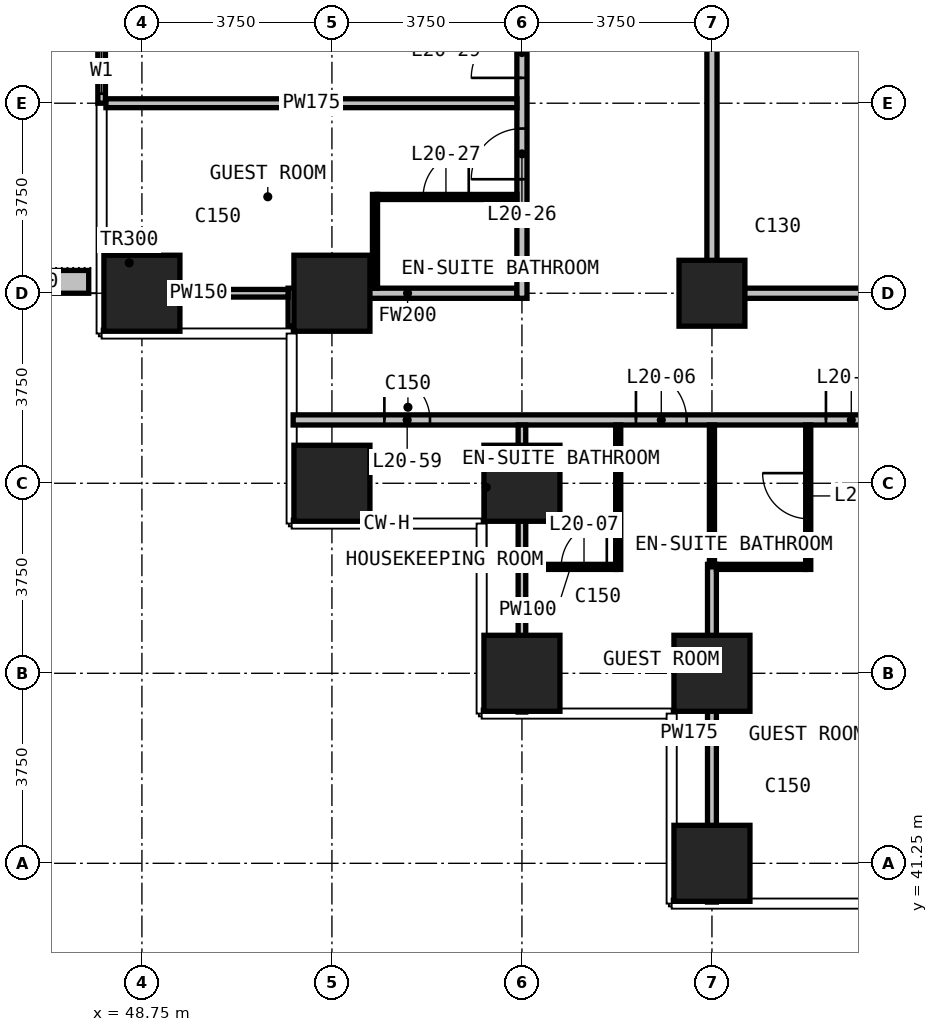
"""IFC4 building model, lengths in metres.
Left out: names, types, materials, properties, quantities, classifications, styles, units other than length and angle.
Written with IfcOpenShell. Run it as: python <this file> out.ifc"""

import sys

from ifc_helpers import new_model, si_unit, direction, frame, frame_2d, origin, origin_2d, place, context, subcontext, project, spatial, rectangle, extrude, element, fill, save


model = new_model("IFC4")
c1 = context("Model", 3, precision=1e-05, world=origin(), true_north=direction((0.0, 1.0)))
c2 = subcontext(c1, "Body", "Model", "MODEL_VIEW")
j1 = project(units=[si_unit("LENGTHUNIT", "METRE"), si_unit("PLANEANGLEUNIT", "RADIAN")], contexts=[c1])
p1 = place(None, origin())
s1 = spatial("IfcSite", under=j1, at=p1, CompositionType="ELEMENT")
p2 = place(p1, origin())
s2 = spatial("IfcBuilding", under=s1, at=p2, CompositionType="ELEMENT")
p3 = place(p2, frame((0.0, 0.0, 85.7)))
s3 = spatial("IfcBuildingStorey", under=s2, at=p3, CompositionType="ELEMENT", Elevation=85.7)
for number, where, z_axis, x_axis in (
    (1, (48.75, 52.5, 0.0), (0.0, 0.0, 1.0), (1.0, 0.0, 0.0)),
    (2, (52.5, 48.75, 0.0), (0.0, 0.0, 1.0), (1.0, 0.0, 0.0)),
    (3, (52.5, 52.5, 0.0), (0.0, 0.0, 1.0), (1.0, 0.0, 0.0)),
    (4, (56.25, 45.0, 0.0), (0.0, 0.0, 1.0), (1.0, 0.0, 0.0)),
    (5, (56.25, 48.75, 0.0), (0.0, 0.0, 1.0), (1.0, 0.0, 0.0)),
    (6, (60.0, 41.25, 0.0), (0.0, 0.0, 1.0), (1.0, 0.0, 0.0)),
    (7, (60.0, 45.0, 0.0), (0.0, 0.0, 1.0), (1.0, 0.0, 0.0)),
):
    element("IfcColumn", number, at=place(p3, frame(where, z_axis=z_axis, x_axis=x_axis)), inside=s3, PredefinedType="COLUMN", context=c2, shape_type="SweptSolid", body=[
        extrude(rectangle(XDim=1.5, YDim=1.5, at=origin_2d()), origin(), (0.0, 0.0, 1.0), 3.3),
    ])
p4 = place(p3, frame((60.0, 52.5, 0.0), z_axis=(0.0, 0.0, 1.0), x_axis=(1.0, 0.0, 0.0)))
e8 = element("IfcColumn", 8, at=p4, inside=s3, PredefinedType="COLUMN", context=c2, shape_type="SweptSolid", body=[
    extrude(rectangle(XDim=1.3, YDim=1.3, at=origin_2d()), origin(), (0.0, 0.0, 1.0), 3.3),
])
p5 = place(p3, frame((47.955, 56.25, 0.0), z_axis=(0.0, 0.0, 1.0), x_axis=(0.0, 1.0, 0.0)))
e9 = element("IfcWall", 9, at=p5, inside=s3, PredefinedType="SOLIDWALL", context=c2, shape_type="SweptSolid", body=[
    extrude(rectangle(XDim=3.75, YDim=0.15, at=frame_2d((1.875, 0.0))), origin(), (0.0, 0.0, 1.0), 3.0),
])
p6 = place(p5, frame((0.188, 0.0, 0.1)))
e10 = element("IfcOpeningElement", 10, at=p6, cuts=e9, PredefinedType="OPENING", context=c2, shape_type="SweptSolid", body=[
    extrude(rectangle(XDim=0.9, YDim=2.4, at=frame_2d((0.45, 1.2))), frame((0.0, 0.085, 0.0), z_axis=(0.0, -1.0, 0.0), x_axis=(1.0, 0.0, 0.0)), (0.0, 0.0, 1.0), 0.17),
])
p7 = place(p5, frame((1.275, 0.0, 0.0)))
e11 = element("IfcOpeningElement", 11, at=p7, cuts=e9, PredefinedType="OPENING", context=c2, shape_type="SweptSolid", body=[
    extrude(rectangle(XDim=1.2, YDim=2.4, at=frame_2d((0.6, 1.2))), frame((0.0, 0.085, 0.0), z_axis=(0.0, -1.0, 0.0), x_axis=(1.0, 0.0, 0.0)), (0.0, 0.0, 1.0), 0.17),
])
p8 = place(p3, frame((47.7, 52.725, 0.0), z_axis=(0.0, 0.0, 1.0), x_axis=(-1.0, 0.0, 0.0)))
e12 = element("IfcWall", 12, at=p8, inside=s3, PredefinedType="USERDEFINED", context=c2, shape_type="SweptSolid", body=[
    extrude(rectangle(XDim=2.35, YDim=0.45, at=frame_2d((1.175, 0.0))), origin(), (0.0, 0.0, 1.0), 1.1),
])
p9 = place(p3, frame((51.735, 50.0, 0.0), z_axis=(0.0, 0.0, 1.0), x_axis=(1.0, 0.0, 0.0)))
e13 = element("IfcWall", 13, at=p9, inside=s3, PredefinedType="PARTITIONING", context=c2, shape_type="SweptSolid", body=[
    extrude(rectangle(XDim=46.53, YDim=0.2, at=frame_2d((23.265, 0.0))), origin(), (0.0, 0.0, 1.0), 3.0),
])
p10 = place(p9, frame((6.765, 0.0, 0.0)))
e14 = element("IfcOpeningElement", 14, at=p10, cuts=e13, PredefinedType="OPENING", context=c2, shape_type="SweptSolid", body=[
    extrude(rectangle(XDim=1.0, YDim=2.2, at=frame_2d((0.5, 1.1))), frame((0.0, 0.11, 0.0), z_axis=(0.0, -1.0, 0.0), x_axis=(1.0, 0.0, 0.0)), (0.0, 0.0, 1.0), 0.22),
])
p11 = place(p9, frame((10.515, 0.0, 0.0)))
e15 = element("IfcOpeningElement", 15, at=p11, cuts=e13, PredefinedType="OPENING", context=c2, shape_type="SweptSolid", body=[
    extrude(rectangle(XDim=1.0, YDim=2.2, at=frame_2d((0.5, 1.1))), frame((0.0, 0.11, 0.0), z_axis=(0.0, -1.0, 0.0), x_axis=(1.0, 0.0, 0.0)), (0.0, 0.0, 1.0), 0.22),
])
p12 = place(p9, frame((12.515, 0.0, 0.0)))
e16 = element("IfcOpeningElement", 16, at=p12, cuts=e13, PredefinedType="OPENING", context=c2, shape_type="SweptSolid", body=[
    extrude(rectangle(XDim=1.0, YDim=2.2, at=frame_2d((0.5, 1.1))), frame((0.0, 0.11, 0.0), z_axis=(0.0, -1.0, 0.0), x_axis=(1.0, 0.0, 0.0)), (0.0, 0.0, 1.0), 0.22),
])
p13 = place(p9, frame((18.015, 0.0, 0.0)))
e17 = element("IfcOpeningElement", 17, at=p13, cuts=e13, PredefinedType="OPENING", context=c2, shape_type="SweptSolid", body=[
    extrude(rectangle(XDim=1.0, YDim=2.2, at=frame_2d((0.5, 1.1))), frame((0.0, 0.11, 0.0), z_axis=(0.0, -1.0, 0.0), x_axis=(1.0, 0.0, 0.0)), (0.0, 0.0, 1.0), 0.22),
])
p14 = place(p9, frame((20.015, 0.0, 0.0)))
e18 = element("IfcOpeningElement", 18, at=p14, cuts=e13, PredefinedType="OPENING", context=c2, shape_type="SweptSolid", body=[
    extrude(rectangle(XDim=1.0, YDim=2.2, at=frame_2d((0.5, 1.1))), frame((0.0, 0.11, 0.0), z_axis=(0.0, -1.0, 0.0), x_axis=(1.0, 0.0, 0.0)), (0.0, 0.0, 1.0), 0.22),
])
p15 = place(p9, frame((25.515, 0.0, 0.0)))
e19 = element("IfcOpeningElement", 19, at=p15, cuts=e13, PredefinedType="OPENING", context=c2, shape_type="SweptSolid", body=[
    extrude(rectangle(XDim=1.0, YDim=2.2, at=frame_2d((0.5, 1.1))), frame((0.0, 0.11, 0.0), z_axis=(0.0, -1.0, 0.0), x_axis=(1.0, 0.0, 0.0)), (0.0, 0.0, 1.0), 0.22),
])
p16 = place(p9, frame((27.515, 0.0, 0.0)))
e20 = element("IfcOpeningElement", 20, at=p16, cuts=e13, PredefinedType="OPENING", context=c2, shape_type="SweptSolid", body=[
    extrude(rectangle(XDim=1.0, YDim=2.2, at=frame_2d((0.5, 1.1))), frame((0.0, 0.11, 0.0), z_axis=(0.0, -1.0, 0.0), x_axis=(1.0, 0.0, 0.0)), (0.0, 0.0, 1.0), 0.22),
])
p17 = place(p9, frame((33.015, 0.0, 0.0)))
e21 = element("IfcOpeningElement", 21, at=p17, cuts=e13, PredefinedType="OPENING", context=c2, shape_type="SweptSolid", body=[
    extrude(rectangle(XDim=1.0, YDim=2.2, at=frame_2d((0.5, 1.1))), frame((0.0, 0.11, 0.0), z_axis=(0.0, -1.0, 0.0), x_axis=(1.0, 0.0, 0.0)), (0.0, 0.0, 1.0), 0.22),
])
p18 = place(p9, frame((35.015, 0.0, 0.0)))
e22 = element("IfcOpeningElement", 22, at=p18, cuts=e13, PredefinedType="OPENING", context=c2, shape_type="SweptSolid", body=[
    extrude(rectangle(XDim=1.0, YDim=2.2, at=frame_2d((0.5, 1.1))), frame((0.0, 0.11, 0.0), z_axis=(0.0, -1.0, 0.0), x_axis=(1.0, 0.0, 0.0)), (0.0, 0.0, 1.0), 0.22),
])
p19 = place(p9, frame((38.765, 0.0, 0.0)))
e23 = element("IfcOpeningElement", 23, at=p19, cuts=e13, PredefinedType="OPENING", context=c2, shape_type="SweptSolid", body=[
    extrude(rectangle(XDim=1.0, YDim=2.2, at=frame_2d((0.5, 1.1))), frame((0.0, 0.11, 0.0), z_axis=(0.0, -1.0, 0.0), x_axis=(1.0, 0.0, 0.0)), (0.0, 0.0, 1.0), 0.22),
])
p20 = place(p9, frame((1.8, 0.0, 0.0)))
e24 = element("IfcOpeningElement", 24, at=p20, cuts=e13, PredefinedType="OPENING", context=c2, shape_type="SweptSolid", body=[
    extrude(rectangle(XDim=0.9, YDim=2.2, at=frame_2d((0.45, 1.1))), frame((0.0, 0.11, 0.0), z_axis=(0.0, -1.0, 0.0), x_axis=(1.0, 0.0, 0.0)), (0.0, 0.0, 1.0), 0.22),
])
p21 = place(p9, frame((43.815, 0.0, 0.0)))
e25 = element("IfcOpeningElement", 25, at=p21, cuts=e13, PredefinedType="OPENING", context=c2, shape_type="SweptSolid", body=[
    extrude(rectangle(XDim=0.9, YDim=2.2, at=frame_2d((0.45, 1.1))), frame((0.0, 0.11, 0.0), z_axis=(0.0, -1.0, 0.0), x_axis=(1.0, 0.0, 0.0)), (0.0, 0.0, 1.0), 0.22),
])
p22 = place(p3, frame((51.835, 52.5, 0.0), z_axis=(0.0, 0.0, 1.0), x_axis=(1.0, 0.0, 0.0)))
e26 = element("IfcWall", 26, at=p22, inside=s3, PredefinedType="PARTITIONING", context=c2, shape_type="SweptSolid", body=[
    extrude(rectangle(XDim=4.315, YDim=0.2, at=frame_2d((2.157, 0.0))), origin(), (0.0, 0.0, 1.0), 3.0),
])
p23 = place(p3, frame((60.1, 52.5, 0.0), z_axis=(0.0, 0.0, 1.0), x_axis=(1.0, 0.0, 0.0)))
e27 = element("IfcWall", 27, at=p23, inside=s3, PredefinedType="PARTITIONING", context=c2, shape_type="SweptSolid", body=[
    extrude(rectangle(XDim=29.8, YDim=0.2, at=frame_2d((14.9, 0.0))), origin(), (0.0, 0.0, 1.0), 3.0),
])
p24 = place(p23, frame((8.4, 0.0, 0.0)))
e28 = element("IfcOpeningElement", 28, at=p24, cuts=e27, PredefinedType="OPENING", context=c2, shape_type="SweptSolid", body=[
    extrude(rectangle(XDim=1.8, YDim=2.2, at=frame_2d((0.9, 1.1))), frame((0.0, 0.11, 0.0), z_axis=(0.0, -1.0, 0.0), x_axis=(1.0, 0.0, 0.0)), (0.0, 0.0, 1.0), 0.22),
])
p25 = place(p23, frame((23.75, 0.0, 0.0)))
e29 = element("IfcOpeningElement", 29, at=p25, cuts=e27, PredefinedType="OPENING", context=c2, shape_type="SweptSolid", body=[
    extrude(rectangle(XDim=0.9, YDim=2.2, at=frame_2d((0.45, 1.1))), frame((0.0, 0.11, 0.0), z_axis=(0.0, -1.0, 0.0), x_axis=(1.0, 0.0, 0.0)), (0.0, 0.0, 1.0), 0.22),
])
p26 = place(p3, frame((51.735, 51.855, 0.0), z_axis=(0.0, 0.0, 1.0), x_axis=(0.0, 1.0, 0.0)))
e30 = element("IfcWall", 30, at=p26, inside=s3, PredefinedType="PARTITIONING", context=c2, shape_type="SweptSolid", body=[
    extrude(rectangle(XDim=0.745, YDim=0.2, at=frame_2d((0.373, 0.0))), origin(), (0.0, 0.0, 1.0), 3.0),
])
p27 = place(p3, frame((56.25, 52.4, 0.0), z_axis=(0.0, 0.0, 1.0), x_axis=(0.0, 1.0, 0.0)))
e31 = element("IfcWall", 31, at=p27, inside=s3, PredefinedType="PARTITIONING", context=c2, shape_type="SweptSolid", body=[
    extrude(rectangle(XDim=33.925, YDim=0.2, at=frame_2d((16.962, 0.0))), origin(), (0.0, 0.0, 1.0), 3.0),
])
p28 = place(p27, frame((2.35, 0.0, 0.0)))
e32 = element("IfcOpeningElement", 32, at=p28, cuts=e31, PredefinedType="OPENING", context=c2, shape_type="SweptSolid", body=[
    extrude(rectangle(XDim=1.0, YDim=2.2, at=frame_2d((0.5, 1.1))), frame((0.0, 0.11, 0.0), z_axis=(0.0, -1.0, 0.0), x_axis=(1.0, 0.0, 0.0)), (0.0, 0.0, 1.0), 0.22),
])
p29 = place(p27, frame((4.35, 0.0, 0.0)))
e33 = element("IfcOpeningElement", 33, at=p29, cuts=e31, PredefinedType="OPENING", context=c2, shape_type="SweptSolid", body=[
    extrude(rectangle(XDim=1.0, YDim=2.2, at=frame_2d((0.5, 1.1))), frame((0.0, 0.11, 0.0), z_axis=(0.0, -1.0, 0.0), x_axis=(1.0, 0.0, 0.0)), (0.0, 0.0, 1.0), 0.22),
])
p30 = place(p27, frame((9.85, 0.0, 0.0)))
e34 = element("IfcOpeningElement", 34, at=p30, cuts=e31, PredefinedType="OPENING", context=c2, shape_type="SweptSolid", body=[
    extrude(rectangle(XDim=1.0, YDim=2.2, at=frame_2d((0.5, 1.1))), frame((0.0, 0.11, 0.0), z_axis=(0.0, -1.0, 0.0), x_axis=(1.0, 0.0, 0.0)), (0.0, 0.0, 1.0), 0.22),
])
p31 = place(p27, frame((11.85, 0.0, 0.0)))
e35 = element("IfcOpeningElement", 35, at=p31, cuts=e31, PredefinedType="OPENING", context=c2, shape_type="SweptSolid", body=[
    extrude(rectangle(XDim=1.0, YDim=2.2, at=frame_2d((0.5, 1.1))), frame((0.0, 0.11, 0.0), z_axis=(0.0, -1.0, 0.0), x_axis=(1.0, 0.0, 0.0)), (0.0, 0.0, 1.0), 0.22),
])
p32 = place(p27, frame((17.35, 0.0, 0.0)))
e36 = element("IfcOpeningElement", 36, at=p32, cuts=e31, PredefinedType="OPENING", context=c2, shape_type="SweptSolid", body=[
    extrude(rectangle(XDim=1.0, YDim=2.2, at=frame_2d((0.5, 1.1))), frame((0.0, 0.11, 0.0), z_axis=(0.0, -1.0, 0.0), x_axis=(1.0, 0.0, 0.0)), (0.0, 0.0, 1.0), 0.22),
])
p33 = place(p27, frame((19.35, 0.0, 0.0)))
e37 = element("IfcOpeningElement", 37, at=p33, cuts=e31, PredefinedType="OPENING", context=c2, shape_type="SweptSolid", body=[
    extrude(rectangle(XDim=1.0, YDim=2.2, at=frame_2d((0.5, 1.1))), frame((0.0, 0.11, 0.0), z_axis=(0.0, -1.0, 0.0), x_axis=(1.0, 0.0, 0.0)), (0.0, 0.0, 1.0), 0.22),
])
p34 = place(p27, frame((24.85, 0.0, 0.0)))
e38 = element("IfcOpeningElement", 38, at=p34, cuts=e31, PredefinedType="OPENING", context=c2, shape_type="SweptSolid", body=[
    extrude(rectangle(XDim=1.0, YDim=2.2, at=frame_2d((0.5, 1.1))), frame((0.0, 0.11, 0.0), z_axis=(0.0, -1.0, 0.0), x_axis=(1.0, 0.0, 0.0)), (0.0, 0.0, 1.0), 0.22),
])
p35 = place(p27, frame((26.85, 0.0, 0.0)))
e39 = element("IfcOpeningElement", 39, at=p35, cuts=e31, PredefinedType="OPENING", context=c2, shape_type="SweptSolid", body=[
    extrude(rectangle(XDim=1.0, YDim=2.2, at=frame_2d((0.5, 1.1))), frame((0.0, 0.11, 0.0), z_axis=(0.0, -1.0, 0.0), x_axis=(1.0, 0.0, 0.0)), (0.0, 0.0, 1.0), 0.22),
])
p36 = place(p27, frame((31.55, 0.0, 0.0)))
e40 = element("IfcOpeningElement", 40, at=p36, cuts=e31, PredefinedType="OPENING", context=c2, shape_type="SweptSolid", body=[
    extrude(rectangle(XDim=0.9, YDim=2.2, at=frame_2d((0.45, 1.1))), frame((0.0, 0.11, 0.0), z_axis=(0.0, -1.0, 0.0), x_axis=(1.0, 0.0, 0.0)), (0.0, 0.0, 1.0), 0.22),
])
p37 = place(p3, frame((60.0, 52.4, 0.0), z_axis=(0.0, 0.0, 1.0), x_axis=(0.0, 1.0, 0.0)))
e41 = element("IfcWall", 41, at=p37, inside=s3, PredefinedType="PARTITIONING", context=c2, shape_type="SweptSolid", body=[
    extrude(rectangle(XDim=18.84, YDim=0.2, at=frame_2d((9.42, 0.0))), origin(), (0.0, 0.0, 1.0), 3.0),
])
p38 = place(p37, frame((13.45, 0.0, 0.0)))
e42 = element("IfcOpeningElement", 42, at=p38, cuts=e41, PredefinedType="OPENING", context=c2, shape_type="SweptSolid", body=[
    extrude(rectangle(XDim=1.0, YDim=2.2, at=frame_2d((0.5, 1.1))), frame((0.0, 0.11, 0.0), z_axis=(0.0, -1.0, 0.0), x_axis=(1.0, 0.0, 0.0)), (0.0, 0.0, 1.0), 0.22),
])
p39 = place(p3, frame((48.04, 56.25, 0.0), z_axis=(0.0, 0.0, 1.0), x_axis=(1.0, 0.0, 0.0)))
e43 = element("IfcWall", 43, at=p39, inside=s3, PredefinedType="PARTITIONING", context=c2, shape_type="SweptSolid", body=[
    extrude(rectangle(XDim=8.11, YDim=0.175, at=frame_2d((4.055, 0.0))), origin(), (0.0, 0.0, 1.0), 3.0),
])
p40 = place(p3, frame((60.0, 40.485, 0.0), z_axis=(0.0, 0.0, 1.0), x_axis=(0.0, 1.0, 0.0)))
e44 = element("IfcWall", 44, at=p40, inside=s3, PredefinedType="PARTITIONING", context=c2, shape_type="SweptSolid", body=[
    extrude(rectangle(XDim=6.665, YDim=0.175, at=frame_2d((3.333, 0.0))), origin(), (0.0, 0.0, 1.0), 3.0),
])
p41 = place(p3, frame((48.105, 52.5, 0.0), z_axis=(0.0, 0.0, 1.0), x_axis=(1.0, 0.0, 0.0)))
e45 = element("IfcWall", 45, at=p41, inside=s3, PredefinedType="PARTITIONING", context=c2, shape_type="SweptSolid", body=[
    extrude(rectangle(XDim=3.53, YDim=0.15, at=frame_2d((1.765, 0.0))), origin(), (0.0, 0.0, 1.0), 3.0),
])
p42 = place(p3, frame((56.25, 44.235, 0.0), z_axis=(0.0, 0.0, 1.0), x_axis=(0.0, 1.0, 0.0)))
e46 = element("IfcWall", 46, at=p42, inside=s3, PredefinedType="PARTITIONING", context=c2, shape_type="SweptSolid", body=[
    extrude(rectangle(XDim=5.665, YDim=0.15, at=frame_2d((2.833, 0.0))), origin(), (0.0, 0.0, 1.0), 3.0),
])
p43 = place(p3, frame((56.325, 47.1, 0.0), z_axis=(0.0, 0.0, 1.0), x_axis=(1.0, 0.0, 0.0)))
e47 = element("IfcWall", 47, at=p43, inside=s3, PredefinedType="PARTITIONING", context=c2, shape_type="SweptSolid", body=[
    extrude(rectangle(XDim=1.775, YDim=0.1, at=frame_2d((0.888, 0.0))), origin(), (0.0, 0.0, 1.0), 3.0),
])
p44 = place(p43, frame((0.7, 0.0, 0.0)))
e48 = element("IfcOpeningElement", 48, at=p44, cuts=e47, PredefinedType="OPENING", context=c2, shape_type="SweptSolid", body=[
    extrude(rectangle(XDim=0.9, YDim=2.2, at=frame_2d((0.45, 1.1))), frame((0.0, 0.06, 0.0), z_axis=(0.0, -1.0, 0.0), x_axis=(1.0, 0.0, 0.0)), (0.0, 0.0, 1.0), 0.12),
])
p45 = place(p3, frame((60.088, 47.1, 0.0), z_axis=(0.0, 0.0, 1.0), x_axis=(1.0, 0.0, 0.0)))
e49 = element("IfcWall", 49, at=p45, inside=s3, PredefinedType="PARTITIONING", context=c2, shape_type="SweptSolid", body=[
    extrude(rectangle(XDim=1.762, YDim=0.1, at=frame_2d((0.881, 0.0))), origin(), (0.0, 0.0, 1.0), 3.0),
])
p46 = place(p3, frame((53.4, 54.4, 0.0), z_axis=(0.0, 0.0, 1.0), x_axis=(1.0, 0.0, 0.0)))
e50 = element("IfcWall", 50, at=p46, inside=s3, PredefinedType="PARTITIONING", context=c2, shape_type="SweptSolid", body=[
    extrude(rectangle(XDim=2.75, YDim=0.1, at=frame_2d((1.375, 0.0))), origin(), (0.0, 0.0, 1.0), 3.0),
])
p47 = place(p46, frame((0.9, 0.0, 0.0)))
e51 = element("IfcOpeningElement", 51, at=p47, cuts=e50, PredefinedType="OPENING", context=c2, shape_type="SweptSolid", body=[
    extrude(rectangle(XDim=0.9, YDim=2.2, at=frame_2d((0.45, 1.1))), frame((0.0, 0.06, 0.0), z_axis=(0.0, -1.0, 0.0), x_axis=(1.0, 0.0, 0.0)), (0.0, 0.0, 1.0), 0.12),
])
p48 = place(p3, frame((53.35, 52.6, 0.0), z_axis=(0.0, 0.0, 1.0), x_axis=(0.0, 1.0, 0.0)))
e52 = element("IfcWall", 52, at=p48, inside=s3, PredefinedType="PARTITIONING", context=c2, shape_type="SweptSolid", body=[
    extrude(rectangle(XDim=1.85, YDim=0.1, at=frame_2d((0.925, 0.0))), origin(), (0.0, 0.0, 1.0), 3.0),
])
p49 = place(p3, frame((58.15, 47.05, 0.0), z_axis=(0.0, 0.0, 1.0), x_axis=(0.0, 1.0, 0.0)))
e53 = element("IfcWall", 53, at=p49, inside=s3, PredefinedType="PARTITIONING", context=c2, shape_type="SweptSolid", body=[
    extrude(rectangle(XDim=2.85, YDim=0.1, at=frame_2d((1.425, 0.0))), origin(), (0.0, 0.0, 1.0), 3.0),
])
p50 = place(p3, frame((60.0, 47.1, 0.0), z_axis=(0.0, 0.0, 1.0), x_axis=(0.0, 1.0, 0.0)))
e54 = element("IfcWall", 54, at=p50, inside=s3, PredefinedType="PARTITIONING", context=c2, shape_type="SweptSolid", body=[
    extrude(rectangle(XDim=2.8, YDim=0.1, at=frame_2d((1.4, 0.0))), origin(), (0.0, 0.0, 1.0), 3.0),
])
p51 = place(p3, frame((61.9, 47.05, 0.0), z_axis=(0.0, 0.0, 1.0), x_axis=(0.0, 1.0, 0.0)))
e55 = element("IfcWall", 55, at=p51, inside=s3, PredefinedType="PARTITIONING", context=c2, shape_type="SweptSolid", body=[
    extrude(rectangle(XDim=2.85, YDim=0.1, at=frame_2d((1.425, 0.0))), origin(), (0.0, 0.0, 1.0), 3.0),
])
p52 = place(p51, frame((1.0, 0.0, 0.0)))
e56 = element("IfcOpeningElement", 56, at=p52, cuts=e55, PredefinedType="OPENING", context=c2, shape_type="SweptSolid", body=[
    extrude(rectangle(XDim=0.9, YDim=2.2, at=frame_2d((0.45, 1.1))), frame((0.0, 0.06, 0.0), z_axis=(0.0, -1.0, 0.0), x_axis=(1.0, 0.0, 0.0)), (0.0, 0.0, 1.0), 0.12),
])
p53 = place(p6, origin())
e57 = element("IfcWindow", 57, at=p53, inside=s3, PartitioningType="SINGLE_PANEL", PredefinedType="WINDOW", context=c2, shape_type="SweptSolid", body=[
    extrude(rectangle(XDim=0.9, YDim=2.4, at=frame_2d((0.45, 1.2))), frame((0.0, 0.03, 0.0), z_axis=(0.0, -1.0, 0.0), x_axis=(1.0, 0.0, 0.0)), (0.0, 0.0, 1.0), 0.06),
])
fill(e10, e57)
p54 = place(p10, origin())
e58 = element("IfcDoor", 58, at=p54, inside=s3, OperationType="SINGLE_SWING_LEFT", PredefinedType="DOOR", context=c2, shape_type="SweptSolid", body=[
    extrude(rectangle(XDim=1.0, YDim=2.2, at=frame_2d((0.5, 1.1))), frame((0.0, 0.025, 0.0), z_axis=(0.0, -1.0, 0.0), x_axis=(1.0, 0.0, 0.0)), (0.0, 0.0, 1.0), 0.05),
])
fill(e14, e58)
p55 = place(p44, origin())
e59 = element("IfcDoor", 59, at=p55, inside=s3, OperationType="SINGLE_SWING_RIGHT", PredefinedType="DOOR", context=c2, shape_type="SweptSolid", body=[
    extrude(rectangle(XDim=0.9, YDim=2.2, at=frame_2d((0.45, 1.1))), frame((0.0, 0.025, 0.0), z_axis=(0.0, -1.0, 0.0), x_axis=(1.0, 0.0, 0.0)), (0.0, 0.0, 1.0), 0.05),
])
fill(e48, e59)
p56 = place(p11, origin())
e60 = element("IfcDoor", 60, at=p56, inside=s3, OperationType="SINGLE_SWING_RIGHT", PredefinedType="DOOR", context=c2, shape_type="SweptSolid", body=[
    extrude(rectangle(XDim=1.0, YDim=2.2, at=frame_2d((0.5, 1.1))), frame((0.0, 0.025, 0.0), z_axis=(0.0, -1.0, 0.0), x_axis=(1.0, 0.0, 0.0)), (0.0, 0.0, 1.0), 0.05),
])
fill(e15, e60)
p57 = place(p52, origin())
e61 = element("IfcDoor", 61, at=p57, inside=s3, OperationType="SINGLE_SWING_RIGHT", PredefinedType="DOOR", context=c2, shape_type="SweptSolid", body=[
    extrude(rectangle(XDim=0.9, YDim=2.2, at=frame_2d((0.45, 1.1))), frame((0.0, 0.025, 0.0), z_axis=(0.0, -1.0, 0.0), x_axis=(1.0, 0.0, 0.0)), (0.0, 0.0, 1.0), 0.05),
])
fill(e56, e61)
p58 = place(p28, origin())
e62 = element("IfcDoor", 62, at=p58, inside=s3, OperationType="SINGLE_SWING_RIGHT", PredefinedType="DOOR", context=c2, shape_type="SweptSolid", body=[
    extrude(rectangle(XDim=1.0, YDim=2.2, at=frame_2d((0.5, 1.1))), frame((0.0, 0.025, 0.0), z_axis=(0.0, -1.0, 0.0), x_axis=(1.0, 0.0, 0.0)), (0.0, 0.0, 1.0), 0.05),
])
fill(e32, e62)
p59 = place(p47, origin())
e63 = element("IfcDoor", 63, at=p59, inside=s3, OperationType="SINGLE_SWING_RIGHT", PredefinedType="DOOR", context=c2, shape_type="SweptSolid", body=[
    extrude(rectangle(XDim=0.9, YDim=2.2, at=frame_2d((0.45, 1.1))), frame((0.0, 0.025, 0.0), z_axis=(0.0, -1.0, 0.0), x_axis=(1.0, 0.0, 0.0)), (0.0, 0.0, 1.0), 0.05),
])
fill(e51, e63)
p60 = place(p29, origin())
e64 = element("IfcDoor", 64, at=p60, inside=s3, OperationType="SINGLE_SWING_LEFT", PredefinedType="DOOR", context=c2, shape_type="SweptSolid", body=[
    extrude(rectangle(XDim=1.0, YDim=2.2, at=frame_2d((0.5, 1.1))), frame((0.0, 0.025, 0.0), z_axis=(0.0, -1.0, 0.0), x_axis=(1.0, 0.0, 0.0)), (0.0, 0.0, 1.0), 0.05),
])
fill(e33, e64)
p61 = place(p20, origin())
e65 = element("IfcDoor", 65, at=p61, inside=s3, OperationType="SINGLE_SWING_LEFT", PredefinedType="DOOR", context=c2, shape_type="SweptSolid", body=[
    extrude(rectangle(XDim=0.9, YDim=2.2, at=frame_2d((0.45, 1.1))), frame((0.0, 0.025, 0.0), z_axis=(0.0, -1.0, 0.0), x_axis=(1.0, 0.0, 0.0)), (0.0, 0.0, 1.0), 0.05),
])
fill(e24, e65)
save(model, sys.argv[1])
